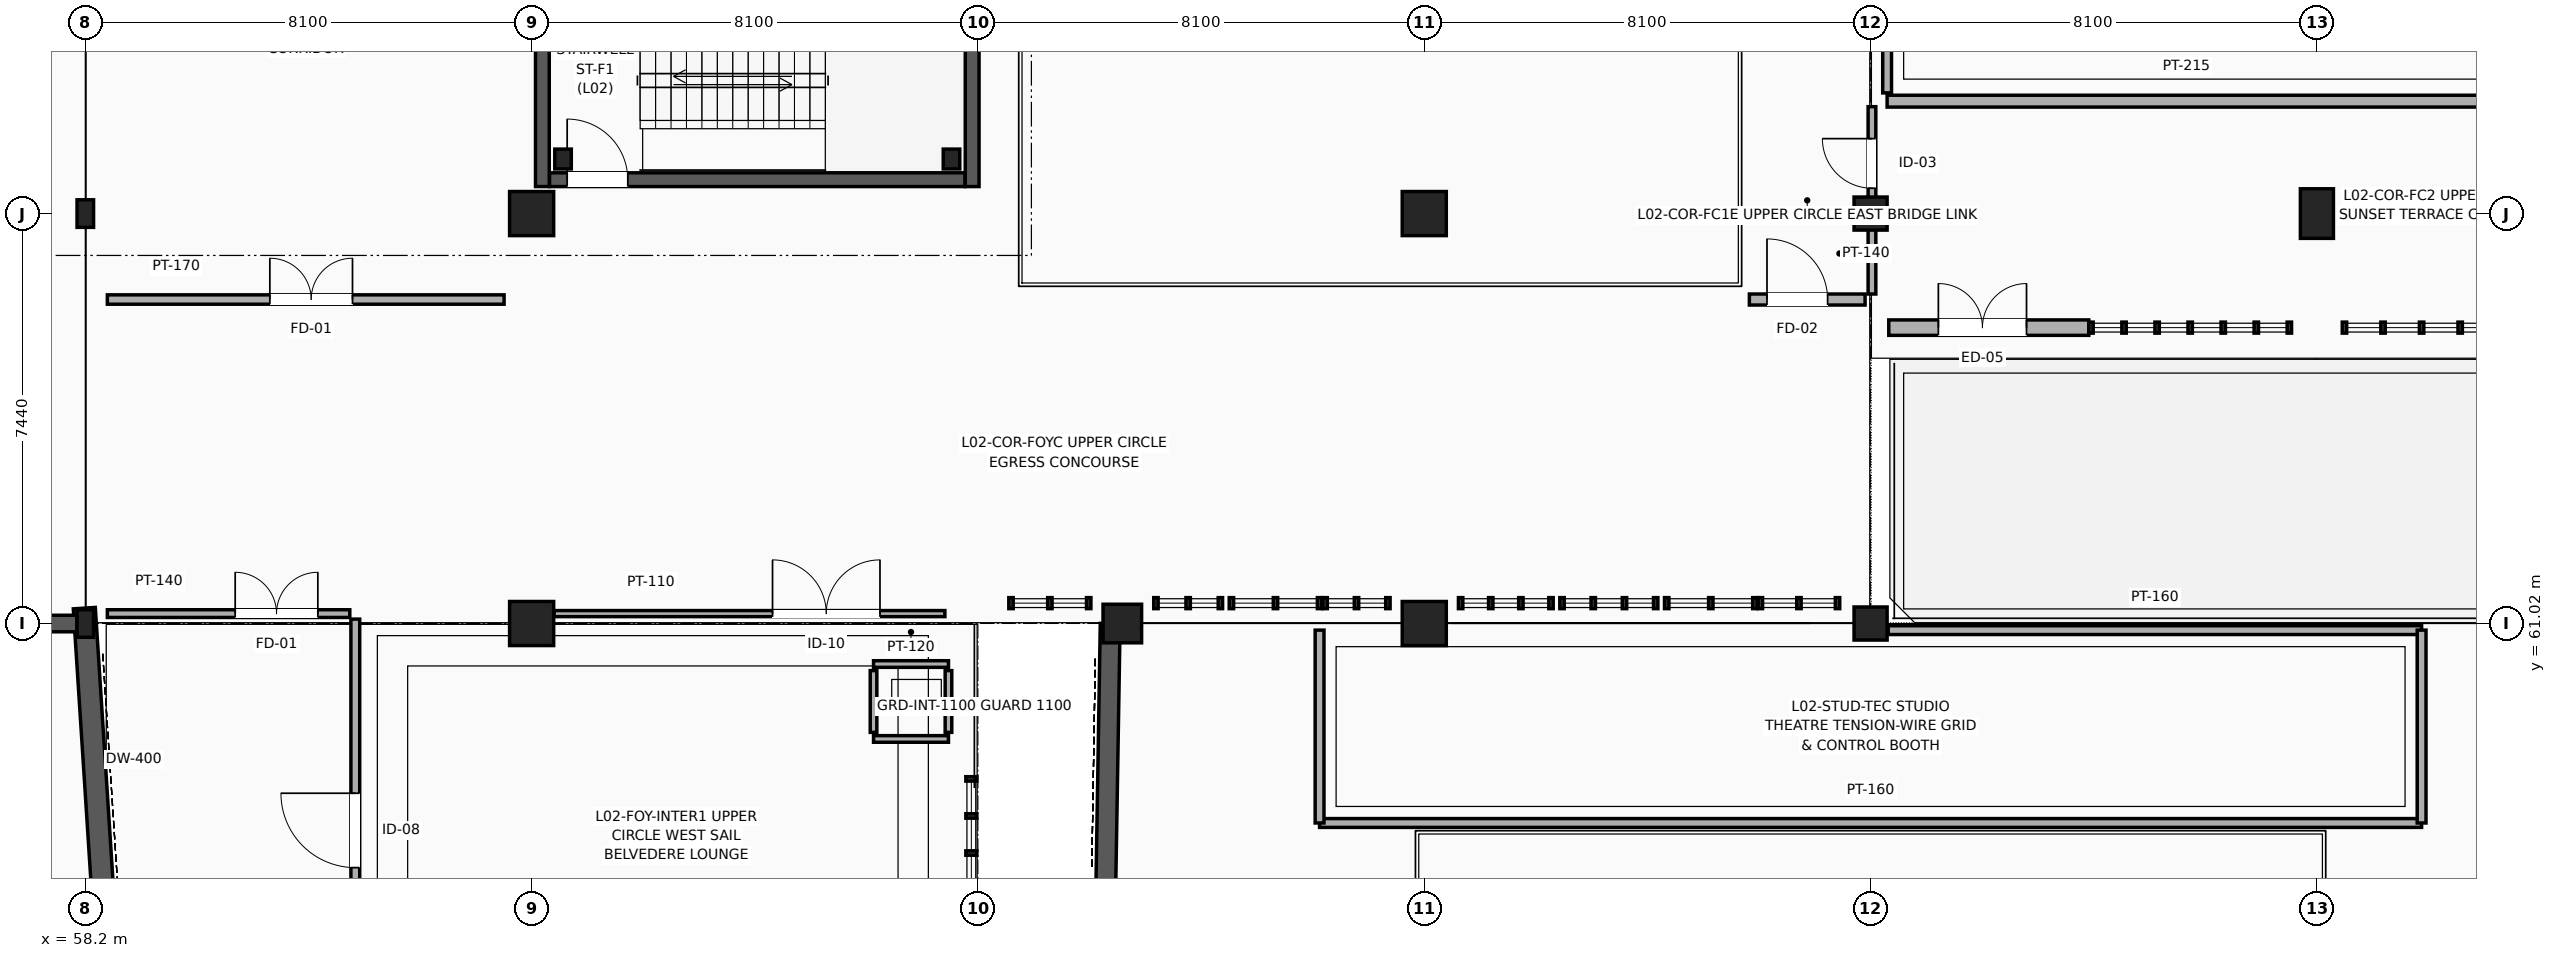
"""IFC4 building model, lengths in metres.
Left out: names, types, materials, properties, quantities, classifications, styles, units other than length and angle.
Written with IfcOpenShell. Run it as: python <this file> out.ifc"""

import sys

from ifc_helpers import new_model, si_unit, direction, frame, frame_2d, origin, origin_2d, place, context, subcontext, project, spatial, rectangle, i_section, extrude, element, fill, save


model = new_model("IFC4")
c1 = context("Model", 3, precision=1e-05, world=origin(), true_north=direction((0.0, 1.0)))
c2 = subcontext(c1, "Body", "Model", "MODEL_VIEW")
j1 = project(units=[si_unit("LENGTHUNIT", "METRE"), si_unit("PLANEANGLEUNIT", "RADIAN")], contexts=[c1])
p1 = place(None, origin())
s1 = spatial("IfcSite", under=j1, at=p1, CompositionType="ELEMENT")
p2 = place(p1, origin())
s2 = spatial("IfcBuilding", under=s1, at=p2, CompositionType="ELEMENT")
p3 = place(p2, frame((0.0, 0.0, 10.2)))
s3 = spatial("IfcBuildingStorey", under=s2, at=p3, CompositionType="ELEMENT", Elevation=10.2)
for number, where, z_axis, x_axis in (
    (1, (66.87, 69.45, 0.0), (0.0, 0.0, 1.0), (1.0, 0.0, 0.0)),
    (2, (73.92, 69.45, 0.0), (0.0, 0.0, 1.0), (1.0, 0.0, 0.0)),
):
    element("IfcColumn", number, at=place(p3, frame(where, z_axis=z_axis, x_axis=x_axis)), inside=s3, PredefinedType="COLUMN", context=c2, shape_type="SweptSolid", body=[
        extrude(i_section(OverallWidth=0.3, OverallDepth=0.36, WebThickness=0.012, FlangeThickness=0.022, FilletRadius=0.027, at=origin_2d()), origin(), (0.0, 0.0, 1.0), 4.5),
    ])
for number, where, z_axis, x_axis in (
    (3, (58.2, 61.02, 0.0), (0.0, 0.0, 1.0), (1.0, 0.0, 0.0)),
    (4, (58.2, 68.46, 0.0), (0.0, 0.0, 1.0), (1.0, 0.0, 0.0)),
):
    element("IfcColumn", number, at=place(p3, frame(where, z_axis=z_axis, x_axis=x_axis)), inside=s3, PredefinedType="COLUMN", context=c2, shape_type="SweptSolid", body=[
        extrude(i_section(OverallWidth=0.3, OverallDepth=0.5, WebThickness=0.014, FlangeThickness=0.028, FilletRadius=0.027, at=origin_2d()), origin(), (0.0, 0.0, 1.0), 4.5),
    ])
for number, where, z_axis, x_axis in (
    (5, (66.3, 61.02, 0.0), (0.0, 0.0, 1.0), (1.0, 0.0, 0.0)),
    (6, (66.3, 68.46, 0.0), (0.0, 0.0, 1.0), (1.0, 0.0, 0.0)),
    (7, (82.5, 61.02, 0.0), (0.0, 0.0, 1.0), (1.0, 0.0, 0.0)),
    (8, (82.5, 68.46, 0.0), (0.0, 0.0, 1.0), (1.0, 0.0, 0.0)),
):
    element("IfcColumn", number, at=place(p3, frame(where, z_axis=z_axis, x_axis=x_axis)), inside=s3, PredefinedType="COLUMN", context=c2, shape_type="SweptSolid", body=[
        extrude(rectangle(XDim=0.8, YDim=0.8, at=origin_2d()), origin(), (0.0, 0.0, 1.0), 4.5),
    ])
for number, where, z_axis, x_axis in (
    (9, (90.6, 61.02, 0.0), (0.0, 0.0, 1.0), (1.0, 0.0, 0.0)),
    (10, (90.6, 68.46, 0.0), (0.0, 0.0, 1.0), (1.0, 0.0, 0.0)),
):
    element("IfcColumn", number, at=place(p3, frame(where, z_axis=z_axis, x_axis=x_axis)), inside=s3, PredefinedType="COLUMN", context=c2, shape_type="SweptSolid", body=[
        extrude(rectangle(XDim=0.6, YDim=0.6, at=origin_2d()), origin(), (0.0, 0.0, 1.0), 4.5),
    ])
p4 = place(p3, frame((98.7, 68.46, 0.0), z_axis=(0.0, 0.0, 1.0), x_axis=(1.0, 0.0, 0.0)))
e11 = element("IfcColumn", 11, at=p4, inside=s3, PredefinedType="COLUMN", context=c2, shape_type="SweptSolid", body=[
    extrude(rectangle(XDim=0.6, YDim=0.9, at=origin_2d()), origin(), (0.0, 0.0, 1.0), 4.5),
])
p5 = place(p3, frame((77.02, 61.02, 0.0), z_axis=(0.0, 0.0, 1.0), x_axis=(1.0, 0.0, 0.0)))
e12 = element("IfcColumn", 12, at=p5, inside=s3, PredefinedType="COLUMN", context=c2, shape_type="SweptSolid", body=[
    extrude(rectangle(XDim=0.7, YDim=0.7, at=origin_2d()), origin(), (0.0, 0.0, 1.0), 6.025),
])
p6 = place(p3, frame((58.182, 61.299, 0.0), z_axis=(0.0, 0.0, 1.0), x_axis=(0.064519893008, -0.997916421053, 0.0)))
e13 = element("IfcWall", 13, at=p6, inside=s3, PredefinedType="SHEAR", context=c2, shape_type="SweptSolid", body=[
    extrude(rectangle(XDim=5.585, YDim=0.4, at=frame_2d((2.792, 0.0))), origin(), (0.0, 0.0, 1.0), 4.225),
])
p7 = place(p3, frame((76.723, 56.365, 0.0), z_axis=(0.0, 0.0, 1.0), x_axis=(0.0166215432, 0.999861852608, 0.0)))
e14 = element("IfcWall", 14, at=p7, inside=s3, PredefinedType="SHEAR", context=c2, shape_type="SweptSolid", body=[
    extrude(rectangle(XDim=4.656, YDim=0.36, at=frame_2d((2.328, 0.0))), origin(), (0.0, 0.0, 1.0), 6.406),
])
p8 = place(p3, frame((90.93, 66.39, 0.0), z_axis=(0.0, 0.0, 1.0), x_axis=(1.0, 0.0, 0.0)))
e15 = element("IfcWall", 15, at=p8, inside=s3, PredefinedType="SOLIDWALL", context=c2, shape_type="SweptSolid", body=[
    extrude(rectangle(XDim=3.63, YDim=0.28, at=frame_2d((1.815, 0.0))), origin(), (0.0, 0.0, 1.0), 4.205),
])
p9 = place(p8, frame((0.9, 0.0, 0.0)))
e16 = element("IfcOpeningElement", 16, at=p9, cuts=e15, PredefinedType="OPENING", context=c2, shape_type="SweptSolid", body=[
    extrude(rectangle(XDim=1.6, YDim=2.3, at=frame_2d((0.8, 1.15))), frame((0.0, 0.15, 0.0), z_axis=(0.0, -1.0, 0.0), x_axis=(1.0, 0.0, 0.0)), (0.0, 0.0, 1.0), 0.3),
])
p10 = place(p3, frame((66.625, 69.075, 0.0), z_axis=(0.0, 0.0, 1.0), x_axis=(1.0, 0.0, 0.0)))
e17 = element("IfcWall", 17, at=p10, inside=s3, PredefinedType="SHEAR", context=c2, shape_type="SweptSolid", body=[
    extrude(rectangle(XDim=7.54, YDim=0.25, at=frame_2d((3.77, 0.0))), origin(), (0.0, 0.0, 1.0), 4.225),
])
p11 = place(p10, frame((0.32, 0.0, 0.0)))
e18 = element("IfcOpeningElement", 18, at=p11, cuts=e17, PredefinedType="OPENING", context=c2, shape_type="SweptSolid", body=[
    extrude(rectangle(XDim=1.1, YDim=2.2, at=frame_2d((0.55, 1.1))), frame((0.0, 0.135, 0.0), z_axis=(0.0, -1.0, 0.0), x_axis=(1.0, 0.0, 0.0)), (0.0, 0.0, 1.0), 0.27),
])
for number, where, z_axis, x_axis in (
    (19, (66.495, 68.95, 0.0), (0.0, 0.0, 1.0), (0.0, 1.0, 0.0)),
    (20, (74.295, 68.95, 0.0), (0.0, 0.0, 1.0), (0.0, 1.0, 0.0)),
):
    element("IfcWall", number, at=place(p3, frame(where, z_axis=z_axis, x_axis=x_axis)), inside=s3, PredefinedType="SHEAR", context=c2, shape_type="SweptSolid", body=[
        extrude(rectangle(XDim=3.85, YDim=0.25, at=frame_2d((1.925, 0.0))), origin(), (0.0, 0.0, 1.0), 4.225),
    ])
p12 = place(p3, frame((50.252, 61.02, 0.0), z_axis=(0.0, 0.0, 1.0), x_axis=(1.0, 0.0, 0.0)))
e21 = element("IfcWall", 21, at=p12, inside=s3, PredefinedType="SHEAR", context=c2, shape_type="SweptSolid", body=[
    extrude(rectangle(XDim=7.796, YDim=0.3, at=frame_2d((3.898, 0.0))), origin(), (0.0, 0.0, 1.0), 4.225),
])
p13 = place(p12, frame((4.35, 0.0, 0.0)))
e22 = element("IfcOpeningElement", 22, at=p13, cuts=e21, PredefinedType="OPENING", context=c2, shape_type="SweptSolid", body=[
    extrude(rectangle(XDim=1.8, YDim=2.4, at=frame_2d((0.9, 1.2))), frame((0.0, 0.16, 0.0), z_axis=(0.0, -1.0, 0.0), x_axis=(1.0, 0.0, 0.0)), (0.0, 0.0, 1.0), 0.32),
])
for number, where, z_axis, x_axis in (
    (23, (72.505, 58.925, 0.0), (0.0, 0.0, 1.0), (1.0, 0.0, 0.0)),
    (24, (72.505, 60.285, 0.0), (0.0, 0.0, 1.0), (1.0, 0.0, 0.0)),
):
    element("IfcWall", number, at=place(p3, frame(where, z_axis=z_axis, x_axis=x_axis)), inside=s3, PredefinedType="PARTITIONING", context=c2, shape_type="SweptSolid", body=[
        extrude(rectangle(XDim=1.36, YDim=0.12, at=frame_2d((0.68, 0.0))), origin(), (0.0, 0.0, 1.0), 4.205),
    ])
for number, where, z_axis, x_axis in (
    (25, (72.505, 59.045, 0.0), (0.0, 0.0, 1.0), (0.0, 1.0, 0.0)),
    (26, (73.865, 59.045, 0.0), (0.0, 0.0, 1.0), (0.0, 1.0, 0.0)),
):
    element("IfcWall", number, at=place(p3, frame(where, z_axis=z_axis, x_axis=x_axis)), inside=s3, PredefinedType="PARTITIONING", context=c2, shape_type="SweptSolid", body=[
        extrude(rectangle(XDim=1.12, YDim=0.12, at=frame_2d((0.56, 0.0))), origin(), (0.0, 0.0, 1.0), 4.205),
    ])
p14 = place(p3, frame((63.1, 48.47, 0.0), z_axis=(0.0, 0.0, 1.0), x_axis=(0.0, 1.0, 0.0)))
e27 = element("IfcWall", 27, at=p14, inside=s3, PredefinedType="PARTITIONING", context=c2, shape_type="SweptSolid", body=[
    extrude(rectangle(XDim=12.63, YDim=0.16, at=frame_2d((6.315, 0.0))), origin(), (0.0, 0.0, 1.0), 3.707),
])
p15 = place(p14, frame((8.12, 0.0, 0.0)))
e28 = element("IfcOpeningElement", 28, at=p15, cuts=e27, PredefinedType="OPENING", context=c2, shape_type="SweptSolid", body=[
    extrude(rectangle(XDim=1.35, YDim=2.2, at=frame_2d((0.675, 1.1))), frame((0.0, 0.09, 0.0), z_axis=(0.0, -1.0, 0.0), x_axis=(1.0, 0.0, 0.0)), (0.0, 0.0, 1.0), 0.18),
])
p16 = place(p3, frame((58.6, 61.2, 0.0), z_axis=(0.0, 0.0, 1.0), x_axis=(1.0, 0.0, 0.0)))
e29 = element("IfcWall", 29, at=p16, inside=s3, PredefinedType="PARTITIONING", context=c2, shape_type="SweptSolid", body=[
    extrude(rectangle(XDim=4.4, YDim=0.14, at=frame_2d((2.2, 0.0))), origin(), (0.0, 0.0, 1.0), 3.877),
])
p17 = place(p16, frame((2.32, 0.0, 0.0)))
e30 = element("IfcOpeningElement", 30, at=p17, cuts=e29, PredefinedType="OPENING", context=c2, shape_type="SweptSolid", body=[
    extrude(rectangle(XDim=1.5, YDim=2.2, at=frame_2d((0.75, 1.1))), frame((0.0, 0.08, 0.0), z_axis=(0.0, -1.0, 0.0), x_axis=(1.0, 0.0, 0.0)), (0.0, 0.0, 1.0), 0.16),
])
p18 = place(p3, frame((66.705, 61.2, 0.0), z_axis=(0.0, 0.0, 1.0), x_axis=(1.0, 0.0, 0.0)))
e31 = element("IfcWall", 31, at=p18, inside=s3, PredefinedType="PARTITIONING", context=c2, shape_type="SweptSolid", body=[
    extrude(rectangle(XDim=7.095, YDim=0.11, at=frame_2d((3.547, 0.0))), origin(), (0.0, 0.0, 1.0), 3.007),
])
p19 = place(p18, frame((3.967, 0.0, 0.0)))
e32 = element("IfcOpeningElement", 32, at=p19, cuts=e31, PredefinedType="OPENING", context=c2, shape_type="SweptSolid", body=[
    extrude(rectangle(XDim=1.95, YDim=2.45, at=frame_2d((0.975, 1.225))), frame((0.0, 0.065, 0.0), z_axis=(0.0, -1.0, 0.0), x_axis=(1.0, 0.0, 0.0)), (0.0, 0.0, 1.0), 0.13),
])
p20 = place(p3, frame((88.4, 66.9, 0.0), z_axis=(0.0, 0.0, 1.0), x_axis=(1.0, 0.0, 0.0)))
e33 = element("IfcWall", 33, at=p20, inside=s3, PredefinedType="PARTITIONING", context=c2, shape_type="SweptSolid", body=[
    extrude(rectangle(XDim=2.1, YDim=0.2, at=frame_2d((1.05, 0.0))), origin(), (0.0, 0.0, 1.0), 3.557),
])
p21 = place(p20, frame((0.32, 0.0, 0.0)))
e34 = element("IfcOpeningElement", 34, at=p21, cuts=e33, PredefinedType="OPENING", context=c2, shape_type="SweptSolid", body=[
    extrude(rectangle(XDim=1.1, YDim=2.2, at=frame_2d((0.55, 1.1))), frame((0.0, 0.11, 0.0), z_axis=(0.0, -1.0, 0.0), x_axis=(1.0, 0.0, 0.0)), (0.0, 0.0, 1.0), 0.22),
])
p22 = place(p3, frame((58.6, 66.9, 0.0), z_axis=(0.0, 0.0, 1.0), x_axis=(1.0, 0.0, 0.0)))
e35 = element("IfcWall", 35, at=p22, inside=s3, PredefinedType="PARTITIONING", context=c2, shape_type="SweptSolid", body=[
    extrude(rectangle(XDim=7.2, YDim=0.17, at=frame_2d((3.6, 0.0))), origin(), (0.0, 0.0, 1.0), 3.847),
])
p23 = place(p22, frame((2.949, 0.0, 0.0)))
e36 = element("IfcOpeningElement", 36, at=p23, cuts=e35, PredefinedType="OPENING", context=c2, shape_type="SweptSolid", body=[
    extrude(rectangle(XDim=1.5, YDim=2.2, at=frame_2d((0.75, 1.1))), frame((0.0, 0.095, 0.0), z_axis=(0.0, -1.0, 0.0), x_axis=(1.0, 0.0, 0.0)), (0.0, 0.0, 1.0), 0.19),
])
p24 = place(p3, frame((90.625, 67.0, 0.0), z_axis=(0.0, 0.0, 1.0), x_axis=(0.0, 1.0, 0.0)))
e37 = element("IfcWall", 37, at=p24, inside=s3, PredefinedType="PARTITIONING", context=c2, shape_type="SweptSolid", body=[
    extrude(rectangle(XDim=3.4, YDim=0.14, at=frame_2d((1.7, 0.0))), origin(), (0.0, 0.0, 1.0), 3.557),
])
p25 = place(p24, frame((1.92, 0.0, 0.0)))
e38 = element("IfcOpeningElement", 38, at=p25, cuts=e37, PredefinedType="OPENING", context=c2, shape_type="SweptSolid", body=[
    extrude(rectangle(XDim=0.9, YDim=2.1, at=frame_2d((0.45, 1.05))), frame((0.0, 0.08, 0.0), z_axis=(0.0, -1.0, 0.0), x_axis=(1.0, 0.0, 0.0)), (0.0, 0.0, 1.0), 0.16),
])
p26 = place(p3, frame((90.9, 70.5, 0.0), z_axis=(0.0, 0.0, 1.0), x_axis=(1.0, 0.0, 0.0)))
e39 = element("IfcWall", 39, at=p26, inside=s3, PredefinedType="PARTITIONING", context=c2, shape_type="SweptSolid", body=[
    extrude(rectangle(XDim=19.5, YDim=0.215, at=frame_2d((9.75, 0.0))), origin(), (0.0, 0.0, 1.0), 3.607),
])
p27 = place(p26, frame((11.312, 0.0, 0.0)))
e40 = element("IfcOpeningElement", 40, at=p27, cuts=e39, PredefinedType="OPENING", context=c2, shape_type="SweptSolid", body=[
    extrude(rectangle(XDim=1.05, YDim=2.25, at=frame_2d((0.525, 1.125))), frame((0.0, 0.117, 0.0), z_axis=(0.0, -1.0, 0.0), x_axis=(1.0, 0.0, 0.0)), (0.0, 0.0, 1.0), 0.235),
])
p28 = place(p3, frame((80.6, 57.4, 0.0), z_axis=(0.0, 0.0, 1.0), x_axis=(1.0, 0.0, 0.0)))
e41 = element("IfcWall", 41, at=p28, inside=s3, PredefinedType="PARTITIONING", context=c2, shape_type="SweptSolid", body=[
    extrude(rectangle(XDim=20.0, YDim=0.16, at=frame_2d((10.0, 0.0))), origin(), (0.0, 0.0, 1.0), 4.205),
])
p29 = place(p3, frame((90.92, 60.9, 0.0), z_axis=(0.0, 0.0, 1.0), x_axis=(1.0, 0.0, 0.0)))
e42 = element("IfcWall", 42, at=p29, inside=s3, PredefinedType="PARTITIONING", context=c2, shape_type="SweptSolid", body=[
    extrude(rectangle(XDim=9.68, YDim=0.16, at=frame_2d((4.84, 0.0))), origin(), (0.0, 0.0, 1.0), 4.205),
])
p30 = place(p3, frame((80.6, 57.4, 0.0), z_axis=(0.0, 0.0, 1.0), x_axis=(0.0, 1.0, 0.0)))
e43 = element("IfcWall", 43, at=p30, inside=s3, PredefinedType="PARTITIONING", context=c2, shape_type="SweptSolid", body=[
    extrude(rectangle(XDim=3.5, YDim=0.16, at=frame_2d((1.75, 0.0))), origin(), (0.0, 0.0, 1.0), 3.007),
])
p31 = place(p3, frame((100.6, 57.4, 0.0), z_axis=(0.0, 0.0, 1.0), x_axis=(0.0, 1.0, 0.0)))
e44 = element("IfcWall", 44, at=p31, inside=s3, PredefinedType="PARTITIONING", context=c2, shape_type="SweptSolid", body=[
    extrude(rectangle(XDim=3.5, YDim=0.16, at=frame_2d((1.75, 0.0))), origin(), (0.0, 0.0, 1.0), 4.205),
])
p32 = place(p3, frame((90.9, 70.65, 0.0), z_axis=(0.0, 0.0, 1.0), x_axis=(0.0, 1.0, 0.0)))
e45 = element("IfcWall", 45, at=p32, inside=s3, PredefinedType="PARTITIONING", context=c2, shape_type="SweptSolid", body=[
    extrude(rectangle(XDim=12.15, YDim=0.16, at=frame_2d((6.075, 0.0))), origin(), (0.0, 0.0, 1.0), 3.707),
])
p33 = place(p9, origin())
e46 = element("IfcDoor", 46, at=p33, inside=s3, OperationType="DOUBLE_DOOR_SINGLE_SWING", PredefinedType="DOOR", context=c2, shape_type="SweptSolid", body=[
    extrude(rectangle(XDim=1.6, YDim=2.3, at=frame_2d((0.8, 1.15))), frame((0.0, 0.025, 0.0), z_axis=(0.0, -1.0, 0.0), x_axis=(1.0, 0.0, 0.0)), (0.0, 0.0, 1.0), 0.05),
])
fill(e16, e46)
p34 = place(p11, origin())
e47 = element("IfcDoor", 47, at=p34, inside=s3, OperationType="SINGLE_SWING_LEFT", PredefinedType="DOOR", context=c2, shape_type="SweptSolid", body=[
    extrude(rectangle(XDim=1.1, YDim=2.2, at=frame_2d((0.55, 1.1))), frame((0.0, 0.025, 0.0), z_axis=(0.0, -1.0, 0.0), x_axis=(1.0, 0.0, 0.0)), (0.0, 0.0, 1.0), 0.05),
])
fill(e18, e47)
p35 = place(p15, origin())
e48 = element("IfcDoor", 48, at=p35, inside=s3, OperationType="SINGLE_SWING_RIGHT", PredefinedType="DOOR", context=c2, shape_type="SweptSolid", body=[
    extrude(rectangle(XDim=1.35, YDim=2.2, at=frame_2d((0.675, 1.1))), frame((0.0, 0.025, 0.0), z_axis=(0.0, -1.0, 0.0), x_axis=(1.0, 0.0, 0.0)), (0.0, 0.0, 1.0), 0.05),
])
fill(e28, e48)
p36 = place(p17, origin())
e49 = element("IfcDoor", 49, at=p36, inside=s3, OperationType="DOUBLE_DOOR_SINGLE_SWING", PredefinedType="DOOR", context=c2, shape_type="SweptSolid", body=[
    extrude(rectangle(XDim=1.5, YDim=2.2, at=frame_2d((0.75, 1.1))), frame((0.0, 0.025, 0.0), z_axis=(0.0, -1.0, 0.0), x_axis=(1.0, 0.0, 0.0)), (0.0, 0.0, 1.0), 0.05),
])
fill(e30, e49)
p37 = place(p19, origin())
e50 = element("IfcDoor", 50, at=p37, inside=s3, OperationType="DOUBLE_DOOR_SINGLE_SWING", PredefinedType="DOOR", context=c2, shape_type="SweptSolid", body=[
    extrude(rectangle(XDim=1.95, YDim=2.45, at=frame_2d((0.975, 1.225))), frame((0.0, 0.025, 0.0), z_axis=(0.0, -1.0, 0.0), x_axis=(1.0, 0.0, 0.0)), (0.0, 0.0, 1.0), 0.05),
])
fill(e32, e50)
p38 = place(p21, origin())
e51 = element("IfcDoor", 51, at=p38, inside=s3, OperationType="SINGLE_SWING_LEFT", PredefinedType="DOOR", context=c2, shape_type="SweptSolid", body=[
    extrude(rectangle(XDim=1.1, YDim=2.2, at=frame_2d((0.55, 1.1))), frame((0.0, 0.025, 0.0), z_axis=(0.0, -1.0, 0.0), x_axis=(1.0, 0.0, 0.0)), (0.0, 0.0, 1.0), 0.05),
])
fill(e34, e51)
p39 = place(p23, origin())
e52 = element("IfcDoor", 52, at=p39, inside=s3, OperationType="DOUBLE_DOOR_SINGLE_SWING", PredefinedType="DOOR", context=c2, shape_type="SweptSolid", body=[
    extrude(rectangle(XDim=1.5, YDim=2.2, at=frame_2d((0.75, 1.1))), frame((0.0, 0.025, 0.0), z_axis=(0.0, -1.0, 0.0), x_axis=(1.0, 0.0, 0.0)), (0.0, 0.0, 1.0), 0.05),
])
fill(e36, e52)
p40 = place(p25, origin())
e53 = element("IfcDoor", 53, at=p40, inside=s3, OperationType="SINGLE_SWING_RIGHT", PredefinedType="DOOR", context=c2, shape_type="SweptSolid", body=[
    extrude(rectangle(XDim=0.9, YDim=2.1, at=frame_2d((0.45, 1.05))), frame((0.0, 0.025, 0.0), z_axis=(0.0, -1.0, 0.0), x_axis=(1.0, 0.0, 0.0)), (0.0, 0.0, 1.0), 0.05),
])
fill(e38, e53)
save(model, sys.argv[1])
